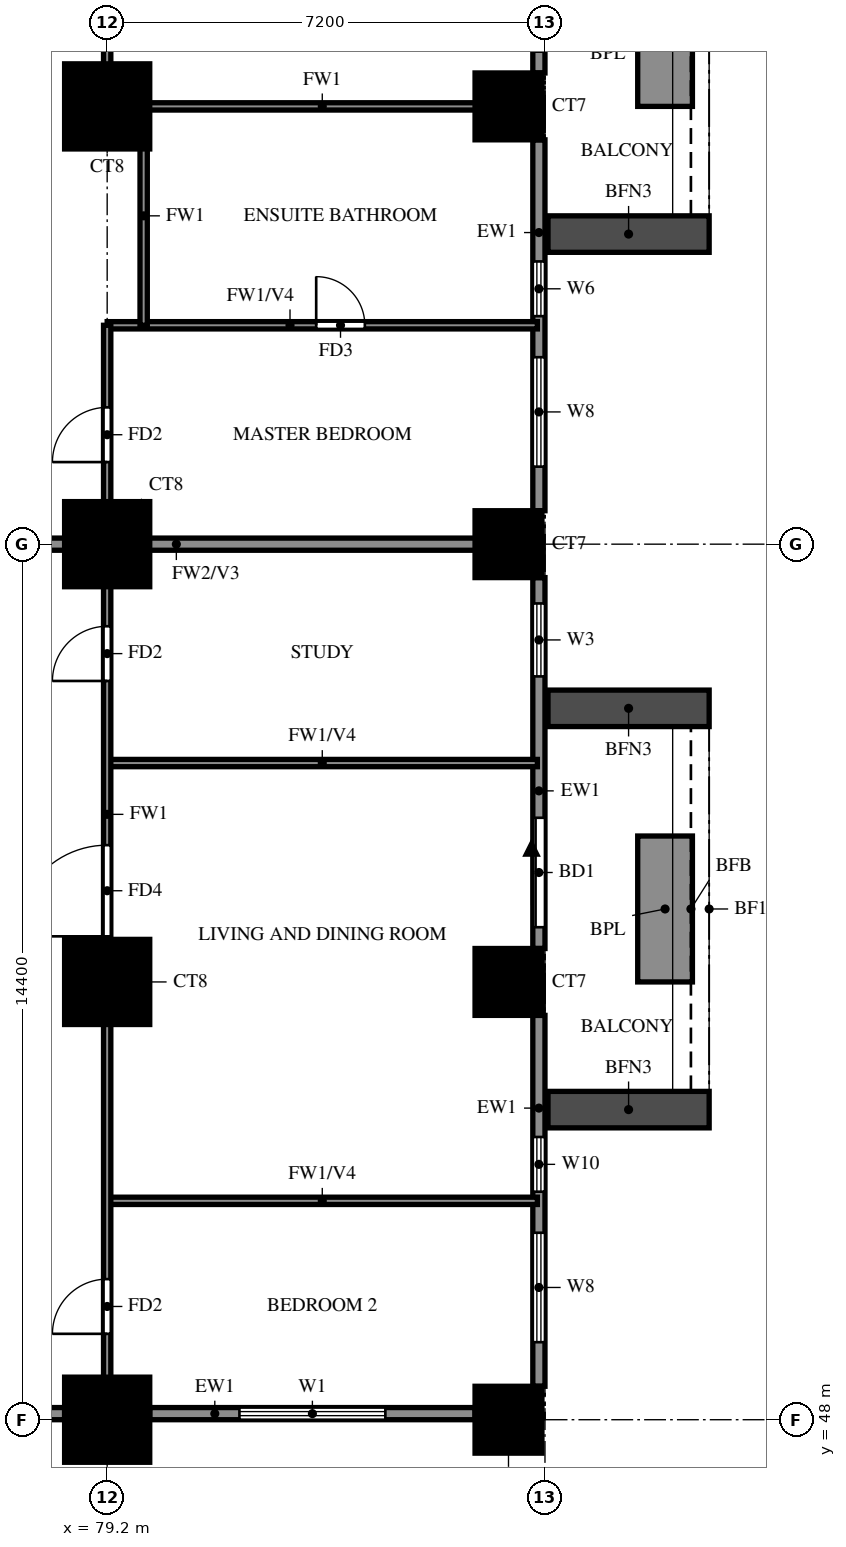
"""IFC4 building model, lengths in metres.
Left out: names, types, materials, properties, quantities, classifications, styles, units other than length and angle.
Written with IfcOpenShell. Run it as: python <this file> out.ifc"""

import sys

from ifc_helpers import new_model, si_unit, direction, frame, frame_2d, origin, origin_2d, place, context, subcontext, project, spatial, rectangle, extrude, source, transform, mapped, element, fill, save


model = new_model("IFC4")
c1 = context("Model", 3, precision=1e-05, world=origin(), true_north=direction((0.0, 1.0)))
c2 = subcontext(c1, "Body", "Model", "MODEL_VIEW")
j1 = project(units=[si_unit("LENGTHUNIT", "METRE"), si_unit("PLANEANGLEUNIT", "RADIAN")], contexts=[c1])
p1 = place(None, origin())
s1 = spatial("IfcSite", under=j1, at=p1, CompositionType="ELEMENT")
p2 = place(p1, origin())
s2 = spatial("IfcBuilding", under=s1, at=p2, CompositionType="ELEMENT")
p3 = place(p2, frame((0.0, 0.0, 48.0)))
s3 = spatial("IfcBuildingStorey", under=s2, at=p3, CompositionType="ELEMENT", Elevation=48.0)
m1 = source(origin(), c2, "Body", "SweptSolid", [
    extrude(rectangle(XDim=1.4, YDim=1.4, at=origin_2d()), origin(), (0.0, 0.0, 1.0), 3.18),
])
p4 = place(p3, frame((79.2, 48.0, 0.0), z_axis=(0.0, 0.0, 1.0), x_axis=(1.0, 0.0, 0.0)))
e1 = element("IfcColumn", 1, at=p4, inside=s3, PredefinedType="COLUMN", context=c2, shape_type="MappedRepresentation", body=[
    mapped(m1, transform((0.0, 0.0, 0.0))),
])
m2 = source(origin(), c2, "Body", "SweptSolid", [
    extrude(rectangle(XDim=1.1, YDim=1.1, at=origin_2d()), origin(), (0.0, 0.0, 1.0), 3.18),
])
p5 = place(p3, frame((85.8, 48.0, 0.0), z_axis=(0.0, 0.0, 1.0), x_axis=(1.0, 0.0, 0.0)))
e2 = element("IfcColumn", 2, at=p5, inside=s3, PredefinedType="COLUMN", context=c2, shape_type="MappedRepresentation", body=[
    mapped(m2, transform((0.0, 0.0, 0.0))),
])
p6 = place(p3, frame((79.2, 55.2, 0.0), z_axis=(0.0, 0.0, 1.0), x_axis=(1.0, 0.0, 0.0)))
e3 = element("IfcColumn", 3, at=p6, inside=s3, PredefinedType="COLUMN", context=c2, shape_type="MappedRepresentation", body=[
    mapped(m1, transform((0.0, 0.0, 0.0))),
])
p7 = place(p3, frame((85.8, 55.2, 0.0), z_axis=(0.0, 0.0, 1.0), x_axis=(1.0, 0.0, 0.0)))
e4 = element("IfcColumn", 4, at=p7, inside=s3, PredefinedType="COLUMN", context=c2, shape_type="MappedRepresentation", body=[
    mapped(m2, transform((0.0, 0.0, 0.0))),
])
p8 = place(p3, frame((79.2, 62.4, 0.0), z_axis=(0.0, 0.0, 1.0), x_axis=(1.0, 0.0, 0.0)))
e5 = element("IfcColumn", 5, at=p8, inside=s3, PredefinedType="COLUMN", context=c2, shape_type="MappedRepresentation", body=[
    mapped(m1, transform((0.0, 0.0, 0.0))),
])
p9 = place(p3, frame((85.8, 62.4, 0.0), z_axis=(0.0, 0.0, 1.0), x_axis=(1.0, 0.0, 0.0)))
e6 = element("IfcColumn", 6, at=p9, inside=s3, PredefinedType="COLUMN", context=c2, shape_type="MappedRepresentation", body=[
    mapped(m2, transform((0.0, 0.0, 0.0))),
])
p10 = place(p3, frame((79.2, 69.6, 0.0), z_axis=(0.0, 0.0, 1.0), x_axis=(1.0, 0.0, 0.0)))
e7 = element("IfcColumn", 7, at=p10, inside=s3, PredefinedType="COLUMN", context=c2, shape_type="MappedRepresentation", body=[
    mapped(m1, transform((0.0, 0.0, 0.0))),
])
p11 = place(p3, frame((85.8, 69.6, 0.0), z_axis=(0.0, 0.0, 1.0), x_axis=(1.0, 0.0, 0.0)))
e8 = element("IfcColumn", 8, at=p11, inside=s3, PredefinedType="COLUMN", context=c2, shape_type="MappedRepresentation", body=[
    mapped(m2, transform((0.0, 0.0, 0.0))),
])
p12 = place(p3, frame((78.74, 41.118, 0.0), z_axis=(0.0, 0.0, 1.0), x_axis=(-0.707106781187, 0.707106781187, 0.0)))
e9 = element("IfcWall", 9, at=p12, inside=s3, PredefinedType="SOLIDWALL", context=c2, shape_type="SweptSolid", body=[
    extrude(rectangle(XDim=9.874, YDim=0.2, at=frame_2d((4.937, 0.0))), origin(), (0.0, 0.0, 1.0), 3.18),
])
p13 = place(p3, frame((71.989, 48.1, 0.0), z_axis=(0.0, 0.0, 1.0), x_axis=(1.0, 0.0, 0.0)))
e10 = element("IfcWall", 10, at=p13, inside=s3, PredefinedType="SOLIDWALL", context=c2, shape_type="SweptSolid", body=[
    extrude(rectangle(XDim=6.511, YDim=0.2, at=frame_2d((3.256, 0.0))), origin(), (0.0, 0.0, 1.0), 3.18),
])
p14 = place(p13, frame((2.206, 0.0, 1.5)))
e11 = element("IfcOpeningElement", 11, at=p14, cuts=e10, PredefinedType="OPENING", context=c2, shape_type="SweptSolid", body=[
    extrude(rectangle(XDim=0.9, YDim=0.9, at=frame_2d((0.45, 0.45))), frame((0.0, 0.11, 0.0), z_axis=(0.0, -1.0, 0.0), x_axis=(1.0, 0.0, 0.0)), (0.0, 0.0, 1.0), 0.22),
])
p15 = place(p3, frame((79.9, 48.1, 0.0), z_axis=(0.0, 0.0, 1.0), x_axis=(1.0, 0.0, 0.0)))
e12 = element("IfcWall", 12, at=p15, inside=s3, PredefinedType="SOLIDWALL", context=c2, shape_type="SweptSolid", body=[
    extrude(rectangle(XDim=5.35, YDim=0.2, at=frame_2d((2.675, 0.0))), origin(), (0.0, 0.0, 1.0), 3.18),
])
p16 = place(p15, frame((1.475, 0.0, 0.6)))
e13 = element("IfcOpeningElement", 13, at=p16, cuts=e12, PredefinedType="OPENING", context=c2, shape_type="SweptSolid", body=[
    extrude(rectangle(XDim=2.4, YDim=2.4, at=frame_2d((1.2, 1.2))), frame((0.0, 0.11, 0.0), z_axis=(0.0, -1.0, 0.0), x_axis=(1.0, 0.0, 0.0)), (0.0, 0.0, 1.0), 0.22),
])
p17 = place(p3, frame((86.3, 48.55, 0.0), z_axis=(0.0, 0.0, 1.0), x_axis=(0.0, 1.0, 0.0)))
e14 = element("IfcWall", 14, at=p17, inside=s3, PredefinedType="SOLIDWALL", context=c2, shape_type="SweptSolid", body=[
    extrude(rectangle(XDim=6.1, YDim=0.2, at=frame_2d((3.05, 0.0))), origin(), (0.0, 0.0, 1.0), 3.18),
])
p18 = place(p17, frame((0.725, 0.0, 0.6)))
e15 = element("IfcOpeningElement", 15, at=p18, cuts=e14, PredefinedType="OPENING", context=c2, shape_type="SweptSolid", body=[
    extrude(rectangle(XDim=1.8, YDim=2.4, at=frame_2d((0.9, 1.2))), frame((0.0, 0.11, 0.0), z_axis=(0.0, -1.0, 0.0), x_axis=(1.0, 0.0, 0.0)), (0.0, 0.0, 1.0), 0.22),
])
p19 = place(p17, frame((3.2, 0.0, 0.6)))
e16 = element("IfcOpeningElement", 16, at=p19, cuts=e14, PredefinedType="OPENING", context=c2, shape_type="SweptSolid", body=[
    extrude(rectangle(XDim=0.9, YDim=2.4, at=frame_2d((0.45, 1.2))), frame((0.0, 0.11, 0.0), z_axis=(0.0, -1.0, 0.0), x_axis=(1.0, 0.0, 0.0)), (0.0, 0.0, 1.0), 0.22),
])
p20 = place(p3, frame((86.3, 55.75, 0.0), z_axis=(0.0, 0.0, 1.0), x_axis=(0.0, 1.0, 0.0)))
e17 = element("IfcWall", 17, at=p20, inside=s3, PredefinedType="SOLIDWALL", context=c2, shape_type="SweptSolid", body=[
    extrude(rectangle(XDim=6.1, YDim=0.2, at=frame_2d((3.05, 0.0))), origin(), (0.0, 0.0, 1.0), 3.18),
])
p21 = place(p20, frame((0.35, 0.0, 0.0)))
e18 = element("IfcOpeningElement", 18, at=p21, cuts=e17, PredefinedType="OPENING", context=c2, shape_type="SweptSolid", body=[
    extrude(rectangle(XDim=1.8, YDim=2.4, at=frame_2d((0.9, 1.2))), frame((0.0, 0.11, 0.0), z_axis=(0.0, -1.0, 0.0), x_axis=(1.0, 0.0, 0.0)), (0.0, 0.0, 1.0), 0.22),
])
p22 = place(p20, frame((4.475, 0.0, 0.6)))
e19 = element("IfcOpeningElement", 19, at=p22, cuts=e17, PredefinedType="OPENING", context=c2, shape_type="SweptSolid", body=[
    extrude(rectangle(XDim=1.2, YDim=2.4, at=frame_2d((0.6, 1.2))), frame((0.0, 0.11, 0.0), z_axis=(0.0, -1.0, 0.0), x_axis=(1.0, 0.0, 0.0)), (0.0, 0.0, 1.0), 0.22),
])
p23 = place(p3, frame((86.3, 62.95, 0.0), z_axis=(0.0, 0.0, 1.0), x_axis=(0.0, 1.0, 0.0)))
e20 = element("IfcWall", 20, at=p23, inside=s3, PredefinedType="SOLIDWALL", context=c2, shape_type="SweptSolid", body=[
    extrude(rectangle(XDim=6.1, YDim=0.2, at=frame_2d((3.05, 0.0))), origin(), (0.0, 0.0, 1.0), 3.18),
])
p24 = place(p23, frame((0.725, 0.0, 0.6)))
e21 = element("IfcOpeningElement", 21, at=p24, cuts=e20, PredefinedType="OPENING", context=c2, shape_type="SweptSolid", body=[
    extrude(rectangle(XDim=1.8, YDim=2.4, at=frame_2d((0.9, 1.2))), frame((0.0, 0.11, 0.0), z_axis=(0.0, -1.0, 0.0), x_axis=(1.0, 0.0, 0.0)), (0.0, 0.0, 1.0), 0.22),
])
p25 = place(p23, frame((3.2, 0.0, 1.5)))
e22 = element("IfcOpeningElement", 22, at=p25, cuts=e20, PredefinedType="OPENING", context=c2, shape_type="SweptSolid", body=[
    extrude(rectangle(XDim=0.9, YDim=0.9, at=frame_2d((0.45, 0.45))), frame((0.0, 0.11, 0.0), z_axis=(0.0, -1.0, 0.0), x_axis=(1.0, 0.0, 0.0)), (0.0, 0.0, 1.0), 0.22),
])
p26 = place(p3, frame((86.3, 70.15, 0.0), z_axis=(0.0, 0.0, 1.0), x_axis=(0.0, 1.0, 0.0)))
e23 = element("IfcWall", 23, at=p26, inside=s3, PredefinedType="SOLIDWALL", context=c2, shape_type="SweptSolid", body=[
    extrude(rectangle(XDim=6.1, YDim=0.2, at=frame_2d((3.05, 0.0))), origin(), (0.0, 0.0, 1.0), 3.18),
])
p27 = place(p26, frame((0.35, 0.0, 0.0)))
e24 = element("IfcOpeningElement", 24, at=p27, cuts=e23, PredefinedType="OPENING", context=c2, shape_type="SweptSolid", body=[
    extrude(rectangle(XDim=1.8, YDim=2.4, at=frame_2d((0.9, 1.2))), frame((0.0, 0.11, 0.0), z_axis=(0.0, -1.0, 0.0), x_axis=(1.0, 0.0, 0.0)), (0.0, 0.0, 1.0), 0.22),
])
p28 = place(p26, frame((4.475, 0.0, 0.6)))
e25 = element("IfcOpeningElement", 25, at=p28, cuts=e23, PredefinedType="OPENING", context=c2, shape_type="SweptSolid", body=[
    extrude(rectangle(XDim=1.2, YDim=2.4, at=frame_2d((0.6, 1.2))), frame((0.0, 0.11, 0.0), z_axis=(0.0, -1.0, 0.0), x_axis=(1.0, 0.0, 0.0)), (0.0, 0.0, 1.0), 0.22),
])
for number, where, z_axis, x_axis in (
    (26, (86.45, 53.1, 0.0), (0.0, 0.0, 1.0), (1.0, 0.0, 0.0)),
    (27, (86.45, 59.7, 0.0), (0.0, 0.0, 1.0), (1.0, 0.0, 0.0)),
):
    element("IfcWall", number, at=place(p3, frame(where, z_axis=z_axis, x_axis=x_axis)), inside=s3, PredefinedType="SOLIDWALL", context=c2, shape_type="SweptSolid", body=[
        extrude(rectangle(XDim=2.65, YDim=0.6, at=frame_2d((1.325, 0.0))), origin(), (0.0, 0.0, 1.0), 2.85),
    ])
p29 = place(p3, frame((88.375, 55.2, 0.0), z_axis=(0.0, 0.0, 1.0), x_axis=(0.0, 1.0, 0.0)))
e28 = element("IfcWall", 28, at=p29, inside=s3, PredefinedType="SOLIDWALL", context=c2, shape_type="SweptSolid", body=[
    extrude(rectangle(XDim=2.4, YDim=0.9, at=frame_2d((1.2, 0.0))), origin(), (0.0, 0.0, 1.0), 0.9),
])
p30 = place(p3, frame((86.45, 67.5, 0.0), z_axis=(0.0, 0.0, 1.0), x_axis=(1.0, 0.0, 0.0)))
e29 = element("IfcWall", 29, at=p30, inside=s3, PredefinedType="SOLIDWALL", context=c2, shape_type="SweptSolid", body=[
    extrude(rectangle(XDim=2.65, YDim=0.6, at=frame_2d((1.325, 0.0))), origin(), (0.0, 0.0, 1.0), 2.85),
])
p31 = place(p3, frame((88.375, 69.6, 0.0), z_axis=(0.0, 0.0, 1.0), x_axis=(0.0, 1.0, 0.0)))
e30 = element("IfcWall", 30, at=p31, inside=s3, PredefinedType="SOLIDWALL", context=c2, shape_type="SweptSolid", body=[
    extrude(rectangle(XDim=2.4, YDim=0.9, at=frame_2d((1.2, 0.0))), origin(), (0.0, 0.0, 1.0), 0.9),
])
p32 = place(p3, frame((74.4, 62.4, 0.0), z_axis=(0.0, 0.0, 1.0), x_axis=(1.0, 0.0, 0.0)))
e31 = element("IfcWall", 31, at=p32, inside=s3, PredefinedType="SOLIDWALL", context=c2, shape_type="SweptSolid", body=[
    extrude(rectangle(XDim=11.875, YDim=0.2, at=frame_2d((5.938, 0.0))), origin(), (0.0, 0.0, 1.0), 3.18),
])
for number, where, z_axis, x_axis in (
    (32, (79.2, 51.6, 0.0), (0.0, 0.0, 1.0), (1.0, 0.0, 0.0)),
    (33, (79.2, 58.8, 0.0), (0.0, 0.0, 1.0), (1.0, 0.0, 0.0)),
):
    element("IfcWall", number, at=place(p3, frame(where, z_axis=z_axis, x_axis=x_axis)), inside=s3, PredefinedType="PARTITIONING", context=c2, shape_type="SweptSolid", body=[
        extrude(rectangle(XDim=7.075, YDim=0.12, at=frame_2d((3.538, 0.0))), origin(), (0.0, 0.0, 1.0), 2.28),
    ])
p33 = place(p3, frame((79.2, 66.0, 0.0), z_axis=(0.0, 0.0, 1.0), x_axis=(1.0, 0.0, 0.0)))
e34 = element("IfcWall", 34, at=p33, inside=s3, PredefinedType="PARTITIONING", context=c2, shape_type="SweptSolid", body=[
    extrude(rectangle(XDim=7.075, YDim=0.12, at=frame_2d((3.538, 0.0))), origin(), (0.0, 0.0, 1.0), 2.28),
])
p34 = place(p33, frame((3.438, 0.0, 0.0)))
e35 = element("IfcOpeningElement", 35, at=p34, cuts=e34, PredefinedType="OPENING", context=c2, shape_type="SweptSolid", body=[
    extrude(rectangle(XDim=0.8, YDim=2.1, at=frame_2d((0.4, 1.05))), frame((0.0, 0.07, 0.0), z_axis=(0.0, -1.0, 0.0), x_axis=(1.0, 0.0, 0.0)), (0.0, 0.0, 1.0), 0.14),
])
p35 = place(p3, frame((79.2, 69.6, 0.0), z_axis=(0.0, 0.0, 1.0), x_axis=(1.0, 0.0, 0.0)))
e36 = element("IfcWall", 36, at=p35, inside=s3, PredefinedType="PARTITIONING", context=c2, shape_type="SweptSolid", body=[
    extrude(rectangle(XDim=7.075, YDim=0.12, at=frame_2d((3.538, 0.0))), origin(), (0.0, 0.0, 1.0), 3.18),
])
p36 = place(p3, frame((79.2, 48.125, 0.0), z_axis=(0.0, 0.0, 1.0), x_axis=(0.0, 1.0, 0.0)))
e37 = element("IfcWall", 37, at=p36, inside=s3, PredefinedType="PARTITIONING", context=c2, shape_type="SweptSolid", body=[
    extrude(rectangle(XDim=17.875, YDim=0.12, at=frame_2d((8.938, 0.0))), origin(), (0.0, 0.0, 1.0), 3.18),
])
p37 = place(p36, frame((1.288, 0.0, 0.0)))
e38 = element("IfcOpeningElement", 38, at=p37, cuts=e37, PredefinedType="OPENING", context=c2, shape_type="SweptSolid", body=[
    extrude(rectangle(XDim=0.9, YDim=2.1, at=frame_2d((0.45, 1.05))), frame((0.0, 0.07, 0.0), z_axis=(0.0, -1.0, 0.0), x_axis=(1.0, 0.0, 0.0)), (0.0, 0.0, 1.0), 0.14),
])
p38 = place(p36, frame((7.825, 0.0, 0.0)))
e39 = element("IfcOpeningElement", 39, at=p38, cuts=e37, PredefinedType="OPENING", context=c2, shape_type="SweptSolid", body=[
    extrude(rectangle(XDim=1.5, YDim=2.1, at=frame_2d((0.75, 1.05))), frame((0.0, 0.07, 0.0), z_axis=(0.0, -1.0, 0.0), x_axis=(1.0, 0.0, 0.0)), (0.0, 0.0, 1.0), 0.14),
])
p39 = place(p36, frame((12.025, 0.0, 0.0)))
e40 = element("IfcOpeningElement", 40, at=p39, cuts=e37, PredefinedType="OPENING", context=c2, shape_type="SweptSolid", body=[
    extrude(rectangle(XDim=0.9, YDim=2.1, at=frame_2d((0.45, 1.05))), frame((0.0, 0.07, 0.0), z_axis=(0.0, -1.0, 0.0), x_axis=(1.0, 0.0, 0.0)), (0.0, 0.0, 1.0), 0.14),
])
p40 = place(p36, frame((15.625, 0.0, 0.0)))
e41 = element("IfcOpeningElement", 41, at=p40, cuts=e37, PredefinedType="OPENING", context=c2, shape_type="SweptSolid", body=[
    extrude(rectangle(XDim=0.9, YDim=2.1, at=frame_2d((0.45, 1.05))), frame((0.0, 0.07, 0.0), z_axis=(0.0, -1.0, 0.0), x_axis=(1.0, 0.0, 0.0)), (0.0, 0.0, 1.0), 0.14),
])
p41 = place(p3, frame((79.2, 69.6, 0.0), z_axis=(0.0, 0.0, 1.0), x_axis=(0.0, 1.0, 0.0)))
e42 = element("IfcWall", 42, at=p41, inside=s3, PredefinedType="PARTITIONING", context=c2, shape_type="SweptSolid", body=[
    extrude(rectangle(XDim=3.6, YDim=0.12, at=frame_2d((1.8, 0.0))), origin(), (0.0, 0.0, 1.0), 3.18),
])
p42 = place(p41, frame((1.35, 0.0, 0.0)))
e43 = element("IfcOpeningElement", 43, at=p42, cuts=e42, PredefinedType="OPENING", context=c2, shape_type="SweptSolid", body=[
    extrude(rectangle(XDim=0.9, YDim=2.1, at=frame_2d((0.45, 1.05))), frame((0.0, 0.07, 0.0), z_axis=(0.0, -1.0, 0.0), x_axis=(1.0, 0.0, 0.0)), (0.0, 0.0, 1.0), 0.14),
])
p43 = place(p3, frame((79.8, 66.0, 0.0), z_axis=(0.0, 0.0, 1.0), x_axis=(0.0, 1.0, 0.0)))
e44 = element("IfcWall", 44, at=p43, inside=s3, PredefinedType="PARTITIONING", context=c2, shape_type="SweptSolid", body=[
    extrude(rectangle(XDim=3.6, YDim=0.12, at=frame_2d((1.8, 0.0))), origin(), (0.0, 0.0, 1.0), 3.18),
])
p44 = place(p16, origin())
e45 = element("IfcWindow", 45, at=p44, inside=s3, PartitioningType="DOUBLE_PANEL_VERTICAL", PredefinedType="WINDOW", context=c2, shape_type="SweptSolid", body=[
    extrude(rectangle(XDim=2.4, YDim=2.4, at=frame_2d((1.2, 1.2))), frame((0.0, 0.03, 0.0), z_axis=(0.0, -1.0, 0.0), x_axis=(1.0, 0.0, 0.0)), (0.0, 0.0, 1.0), 0.06),
])
fill(e13, e45)
p45 = place(p18, origin())
e46 = element("IfcWindow", 46, at=p45, inside=s3, PartitioningType="DOUBLE_PANEL_VERTICAL", PredefinedType="WINDOW", context=c2, shape_type="SweptSolid", body=[
    extrude(rectangle(XDim=1.8, YDim=2.4, at=frame_2d((0.9, 1.2))), frame((0.0, 0.03, 0.0), z_axis=(0.0, -1.0, 0.0), x_axis=(1.0, 0.0, 0.0)), (0.0, 0.0, 1.0), 0.06),
])
fill(e15, e46)
p46 = place(p19, origin())
e47 = element("IfcWindow", 47, at=p46, inside=s3, PartitioningType="SINGLE_PANEL", PredefinedType="WINDOW", context=c2, shape_type="SweptSolid", body=[
    extrude(rectangle(XDim=0.9, YDim=2.4, at=frame_2d((0.45, 1.2))), frame((0.0, 0.03, 0.0), z_axis=(0.0, -1.0, 0.0), x_axis=(1.0, 0.0, 0.0)), (0.0, 0.0, 1.0), 0.06),
])
fill(e16, e47)
p47 = place(p21, origin())
e48 = element("IfcDoor", 48, at=p47, inside=s3, OperationType="DOUBLE_DOOR_SLIDING", PredefinedType="DOOR", context=c2, shape_type="SweptSolid", body=[
    extrude(rectangle(XDim=1.8, YDim=2.4, at=frame_2d((0.9, 1.2))), frame((0.0, 0.025, 0.0), z_axis=(0.0, -1.0, 0.0), x_axis=(1.0, 0.0, 0.0)), (0.0, 0.0, 1.0), 0.05),
])
fill(e18, e48)
p48 = place(p22, origin())
e49 = element("IfcWindow", 49, at=p48, inside=s3, PartitioningType="SINGLE_PANEL", PredefinedType="WINDOW", context=c2, shape_type="SweptSolid", body=[
    extrude(rectangle(XDim=1.2, YDim=2.4, at=frame_2d((0.6, 1.2))), frame((0.0, 0.03, 0.0), z_axis=(0.0, -1.0, 0.0), x_axis=(1.0, 0.0, 0.0)), (0.0, 0.0, 1.0), 0.06),
])
fill(e19, e49)
p49 = place(p24, origin())
e50 = element("IfcWindow", 50, at=p49, inside=s3, PartitioningType="DOUBLE_PANEL_VERTICAL", PredefinedType="WINDOW", context=c2, shape_type="SweptSolid", body=[
    extrude(rectangle(XDim=1.8, YDim=2.4, at=frame_2d((0.9, 1.2))), frame((0.0, 0.03, 0.0), z_axis=(0.0, -1.0, 0.0), x_axis=(1.0, 0.0, 0.0)), (0.0, 0.0, 1.0), 0.06),
])
fill(e21, e50)
p50 = place(p25, origin())
e51 = element("IfcWindow", 51, at=p50, inside=s3, PartitioningType="SINGLE_PANEL", PredefinedType="WINDOW", context=c2, shape_type="SweptSolid", body=[
    extrude(rectangle(XDim=0.9, YDim=0.9, at=frame_2d((0.45, 0.45))), frame((0.0, 0.03, 0.0), z_axis=(0.0, -1.0, 0.0), x_axis=(1.0, 0.0, 0.0)), (0.0, 0.0, 1.0), 0.06),
])
fill(e22, e51)
p51 = place(p27, origin())
e52 = element("IfcDoor", 52, at=p51, inside=s3, OperationType="DOUBLE_DOOR_SLIDING", PredefinedType="DOOR", context=c2, shape_type="SweptSolid", body=[
    extrude(rectangle(XDim=1.8, YDim=2.4, at=frame_2d((0.9, 1.2))), frame((0.0, 0.025, 0.0), z_axis=(0.0, -1.0, 0.0), x_axis=(1.0, 0.0, 0.0)), (0.0, 0.0, 1.0), 0.05),
])
fill(e24, e52)
p52 = place(p37, origin())
e53 = element("IfcDoor", 53, at=p52, inside=s3, OperationType="SINGLE_SWING_RIGHT", PredefinedType="DOOR", context=c2, shape_type="SweptSolid", body=[
    extrude(rectangle(XDim=0.9, YDim=2.1, at=frame_2d((0.45, 1.05))), frame((0.0, 0.025, 0.0), z_axis=(0.0, -1.0, 0.0), x_axis=(1.0, 0.0, 0.0)), (0.0, 0.0, 1.0), 0.05),
])
fill(e38, e53)
p53 = place(p38, origin())
e54 = element("IfcDoor", 54, at=p53, inside=s3, OperationType="SINGLE_SWING_RIGHT", PredefinedType="DOOR", context=c2, shape_type="SweptSolid", body=[
    extrude(rectangle(XDim=1.5, YDim=2.1, at=frame_2d((0.75, 1.05))), frame((0.0, 0.025, 0.0), z_axis=(0.0, -1.0, 0.0), x_axis=(1.0, 0.0, 0.0)), (0.0, 0.0, 1.0), 0.05),
])
fill(e39, e54)
p54 = place(p39, origin())
e55 = element("IfcDoor", 55, at=p54, inside=s3, OperationType="SINGLE_SWING_LEFT", PredefinedType="DOOR", context=c2, shape_type="SweptSolid", body=[
    extrude(rectangle(XDim=0.9, YDim=2.1, at=frame_2d((0.45, 1.05))), frame((0.0, 0.025, 0.0), z_axis=(0.0, -1.0, 0.0), x_axis=(1.0, 0.0, 0.0)), (0.0, 0.0, 1.0), 0.05),
])
fill(e40, e55)
p55 = place(p40, origin())
e56 = element("IfcDoor", 56, at=p55, inside=s3, OperationType="SINGLE_SWING_LEFT", PredefinedType="DOOR", context=c2, shape_type="SweptSolid", body=[
    extrude(rectangle(XDim=0.9, YDim=2.1, at=frame_2d((0.45, 1.05))), frame((0.0, 0.025, 0.0), z_axis=(0.0, -1.0, 0.0), x_axis=(1.0, 0.0, 0.0)), (0.0, 0.0, 1.0), 0.05),
])
fill(e41, e56)
p56 = place(p34, origin())
e57 = element("IfcDoor", 57, at=p56, inside=s3, OperationType="SINGLE_SWING_LEFT", PredefinedType="DOOR", context=c2, shape_type="SweptSolid", body=[
    extrude(rectangle(XDim=0.8, YDim=2.1, at=frame_2d((0.4, 1.05))), frame((0.0, 0.025, 0.0), z_axis=(0.0, -1.0, 0.0), x_axis=(1.0, 0.0, 0.0)), (0.0, 0.0, 1.0), 0.05),
])
fill(e35, e57)
save(model, sys.argv[1])
